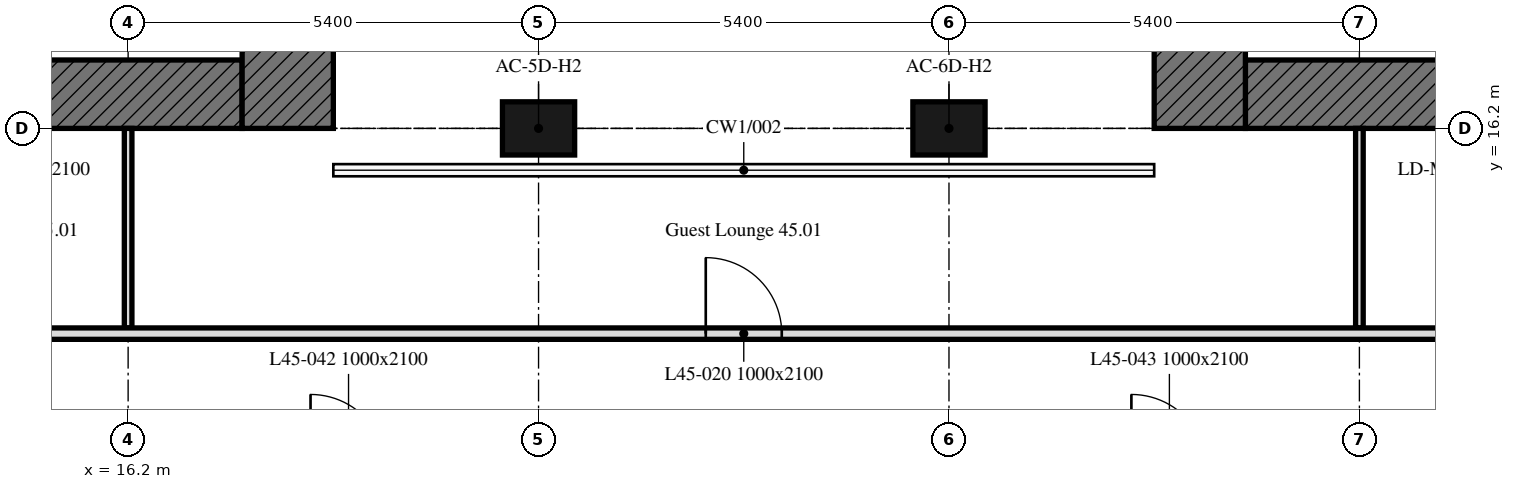
"""IFC4 building model, lengths in metres.
Left out: names, types, materials, properties, quantities, classifications, styles, units other than length and angle.
Written with IfcOpenShell. Run it as: python <this file> out.ifc"""

import sys

from ifc_helpers import new_model, si_unit, direction, frame, frame_2d, origin, origin_2d, place, context, subcontext, project, spatial, rectangle, extrude, element, fill, save


model = new_model("IFC4")
c1 = context("Model", 3, precision=1e-05, world=origin(), true_north=direction((0.0, 1.0)))
c2 = subcontext(c1, "Body", "Model", "MODEL_VIEW")
j1 = project(units=[si_unit("LENGTHUNIT", "METRE"), si_unit("PLANEANGLEUNIT", "RADIAN")], contexts=[c1])
p1 = place(None, origin())
s1 = spatial("IfcSite", under=j1, at=p1, CompositionType="ELEMENT")
p2 = place(p1, origin())
s2 = spatial("IfcBuilding", under=s1, at=p2, CompositionType="ELEMENT")
p3 = place(p2, frame((0.0, 0.0, 187.3)))
s3 = spatial("IfcBuildingStorey", under=s2, at=p3, CompositionType="ELEMENT", Elevation=187.3)
for number, where, z_axis, x_axis in (
    (1, (21.6, 16.2, 0.0), (0.0, 0.0, 1.0), (1.0, 0.0, 0.0)),
    (2, (27.0, 16.2, 0.0), (0.0, 0.0, 1.0), (1.0, 0.0, 0.0)),
):
    element("IfcColumn", number, at=place(p3, frame(where, z_axis=z_axis, x_axis=x_axis)), inside=s3, PredefinedType="COLUMN", context=c2, shape_type="SweptSolid", body=[
        extrude(rectangle(XDim=0.95, YDim=0.7, at=origin_2d()), origin(), (0.0, 0.0, 1.0), 3.0),
    ])
p4 = place(p3, frame((17.7, 16.65, 0.0), z_axis=(0.0, 0.0, 1.0), x_axis=(-1.0, 0.0, 0.0)))
e3 = element("IfcWall", 3, at=p4, inside=s3, PredefinedType="SOLIDWALL", context=c2, shape_type="SweptSolid", body=[
    extrude(rectangle(XDim=11.1, YDim=0.9, at=frame_2d((5.55, 0.0))), origin(), (0.0, 0.0, 1.0), 3.0),
])
p5 = place(p4, frame((5.55, 0.0, 0.0)))
e4 = element("IfcOpeningElement", 4, at=p5, cuts=e3, PredefinedType="OPENING", context=c2, shape_type="SweptSolid", body=[
    extrude(rectangle(XDim=2.0, YDim=2.4, at=frame_2d((1.0, 1.2))), frame((0.0, 0.45, 0.0), z_axis=(0.0, -1.0, 0.0), x_axis=(1.0, 0.0, 0.0)), (0.0, 0.0, 1.0), 0.9),
])
p6 = place(p3, frame((18.3, 32.4, 0.0), z_axis=(0.0, 0.0, 1.0), x_axis=(0.0, -1.0, 0.0)))
e5 = element("IfcWall", 5, at=p6, inside=s3, PredefinedType="SOLIDWALL", context=c2, shape_type="SweptSolid", body=[
    extrude(rectangle(XDim=16.2, YDim=1.2, at=frame_2d((8.1, 0.0))), origin(), (0.0, 0.0, 1.0), 3.0),
])
p7 = place(p3, frame((42.0, 16.65, 0.0), z_axis=(0.0, 0.0, 1.0), x_axis=(-1.0, 0.0, 0.0)))
e6 = element("IfcWall", 6, at=p7, inside=s3, PredefinedType="SOLIDWALL", context=c2, shape_type="SweptSolid", body=[
    extrude(rectangle(XDim=11.1, YDim=0.9, at=frame_2d((5.55, 0.0))), origin(), (0.0, 0.0, 1.0), 3.0),
])
p8 = place(p7, frame((3.55, 0.0, 0.0)))
e7 = element("IfcOpeningElement", 7, at=p8, cuts=e6, PredefinedType="OPENING", context=c2, shape_type="SweptSolid", body=[
    extrude(rectangle(XDim=2.0, YDim=2.4, at=frame_2d((1.0, 1.2))), frame((0.0, 0.45, 0.0), z_axis=(0.0, -1.0, 0.0), x_axis=(1.0, 0.0, 0.0)), (0.0, 0.0, 1.0), 0.9),
])
p9 = place(p3, frame((30.3, 16.2, 0.0), z_axis=(0.0, 0.0, 1.0), x_axis=(0.0, 1.0, 0.0)))
e8 = element("IfcWall", 8, at=p9, inside=s3, PredefinedType="SOLIDWALL", context=c2, shape_type="SweptSolid", body=[
    extrude(rectangle(XDim=16.2, YDim=1.2, at=frame_2d((8.1, 0.0))), origin(), (0.0, 0.0, 1.0), 3.0),
])
for number, where, z_axis, x_axis in (
    (9, (16.2, 16.2, 0.0), (0.0, 0.0, 1.0), (0.0, -1.0, 0.0)),
    (10, (32.4, 13.575, 0.0), (0.0, 0.0, 1.0), (0.0, 1.0, 0.0)),
):
    element("IfcWall", number, at=place(p3, frame(where, z_axis=z_axis, x_axis=x_axis)), inside=s3, PredefinedType="PARTITIONING", context=c2, shape_type="SweptSolid", body=[
        extrude(rectangle(XDim=2.625, YDim=0.1, at=frame_2d((1.312, 0.0))), origin(), (0.0, 0.0, 1.0), 3.0),
    ])
p10 = place(p3, frame((6.151, 13.5, 0.0), z_axis=(0.0, 0.0, 1.0), x_axis=(1.0, 0.0, 0.0)))
e11 = element("IfcWall", 11, at=p10, inside=s3, PredefinedType="PARTITIONING", context=c2, shape_type="SweptSolid", body=[
    extrude(rectangle(XDim=37.124, YDim=0.15, at=frame_2d((18.562, 0.0))), origin(), (0.0, 0.0, 1.0), 3.0),
])
p11 = place(p10, frame((17.649, 0.0, 0.0)))
e12 = element("IfcOpeningElement", 12, at=p11, cuts=e11, PredefinedType="OPENING", context=c2, shape_type="SweptSolid", body=[
    extrude(rectangle(XDim=1.0, YDim=2.1, at=frame_2d((0.5, 1.05))), frame((0.0, 0.075, 0.0), z_axis=(0.0, -1.0, 0.0), x_axis=(1.0, 0.0, 0.0)), (0.0, 0.0, 1.0), 0.15),
])
p12 = place(p10, frame((2.349, 0.0, 0.0)))
e13 = element("IfcOpeningElement", 13, at=p12, cuts=e11, PredefinedType="OPENING", context=c2, shape_type="SweptSolid", body=[
    extrude(rectangle(XDim=1.8, YDim=2.4, at=frame_2d((0.9, 1.2))), frame((0.0, 0.075, 0.0), z_axis=(0.0, -1.0, 0.0), x_axis=(1.0, 0.0, 0.0)), (0.0, 0.0, 1.0), 0.15),
])
p13 = place(p10, frame((29.349, 0.0, 0.0)))
e14 = element("IfcOpeningElement", 14, at=p13, cuts=e11, PredefinedType="OPENING", context=c2, shape_type="SweptSolid", body=[
    extrude(rectangle(XDim=1.8, YDim=2.4, at=frame_2d((0.9, 1.2))), frame((0.0, 0.075, 0.0), z_axis=(0.0, -1.0, 0.0), x_axis=(1.0, 0.0, 0.0)), (0.0, 0.0, 1.0), 0.15),
])
p14 = place(p11, origin())
e15 = element("IfcDoor", 15, at=p14, inside=s3, OperationType="SINGLE_SWING_LEFT", PredefinedType="DOOR", context=c2, shape_type="SweptSolid", body=[
    extrude(rectangle(XDim=1.0, YDim=2.1, at=frame_2d((0.5, 1.05))), frame((0.0, 0.025, 0.0), z_axis=(0.0, -1.0, 0.0), x_axis=(1.0, 0.0, 0.0)), (0.0, 0.0, 1.0), 0.05),
])
fill(e12, e15)
save(model, sys.argv[1])
